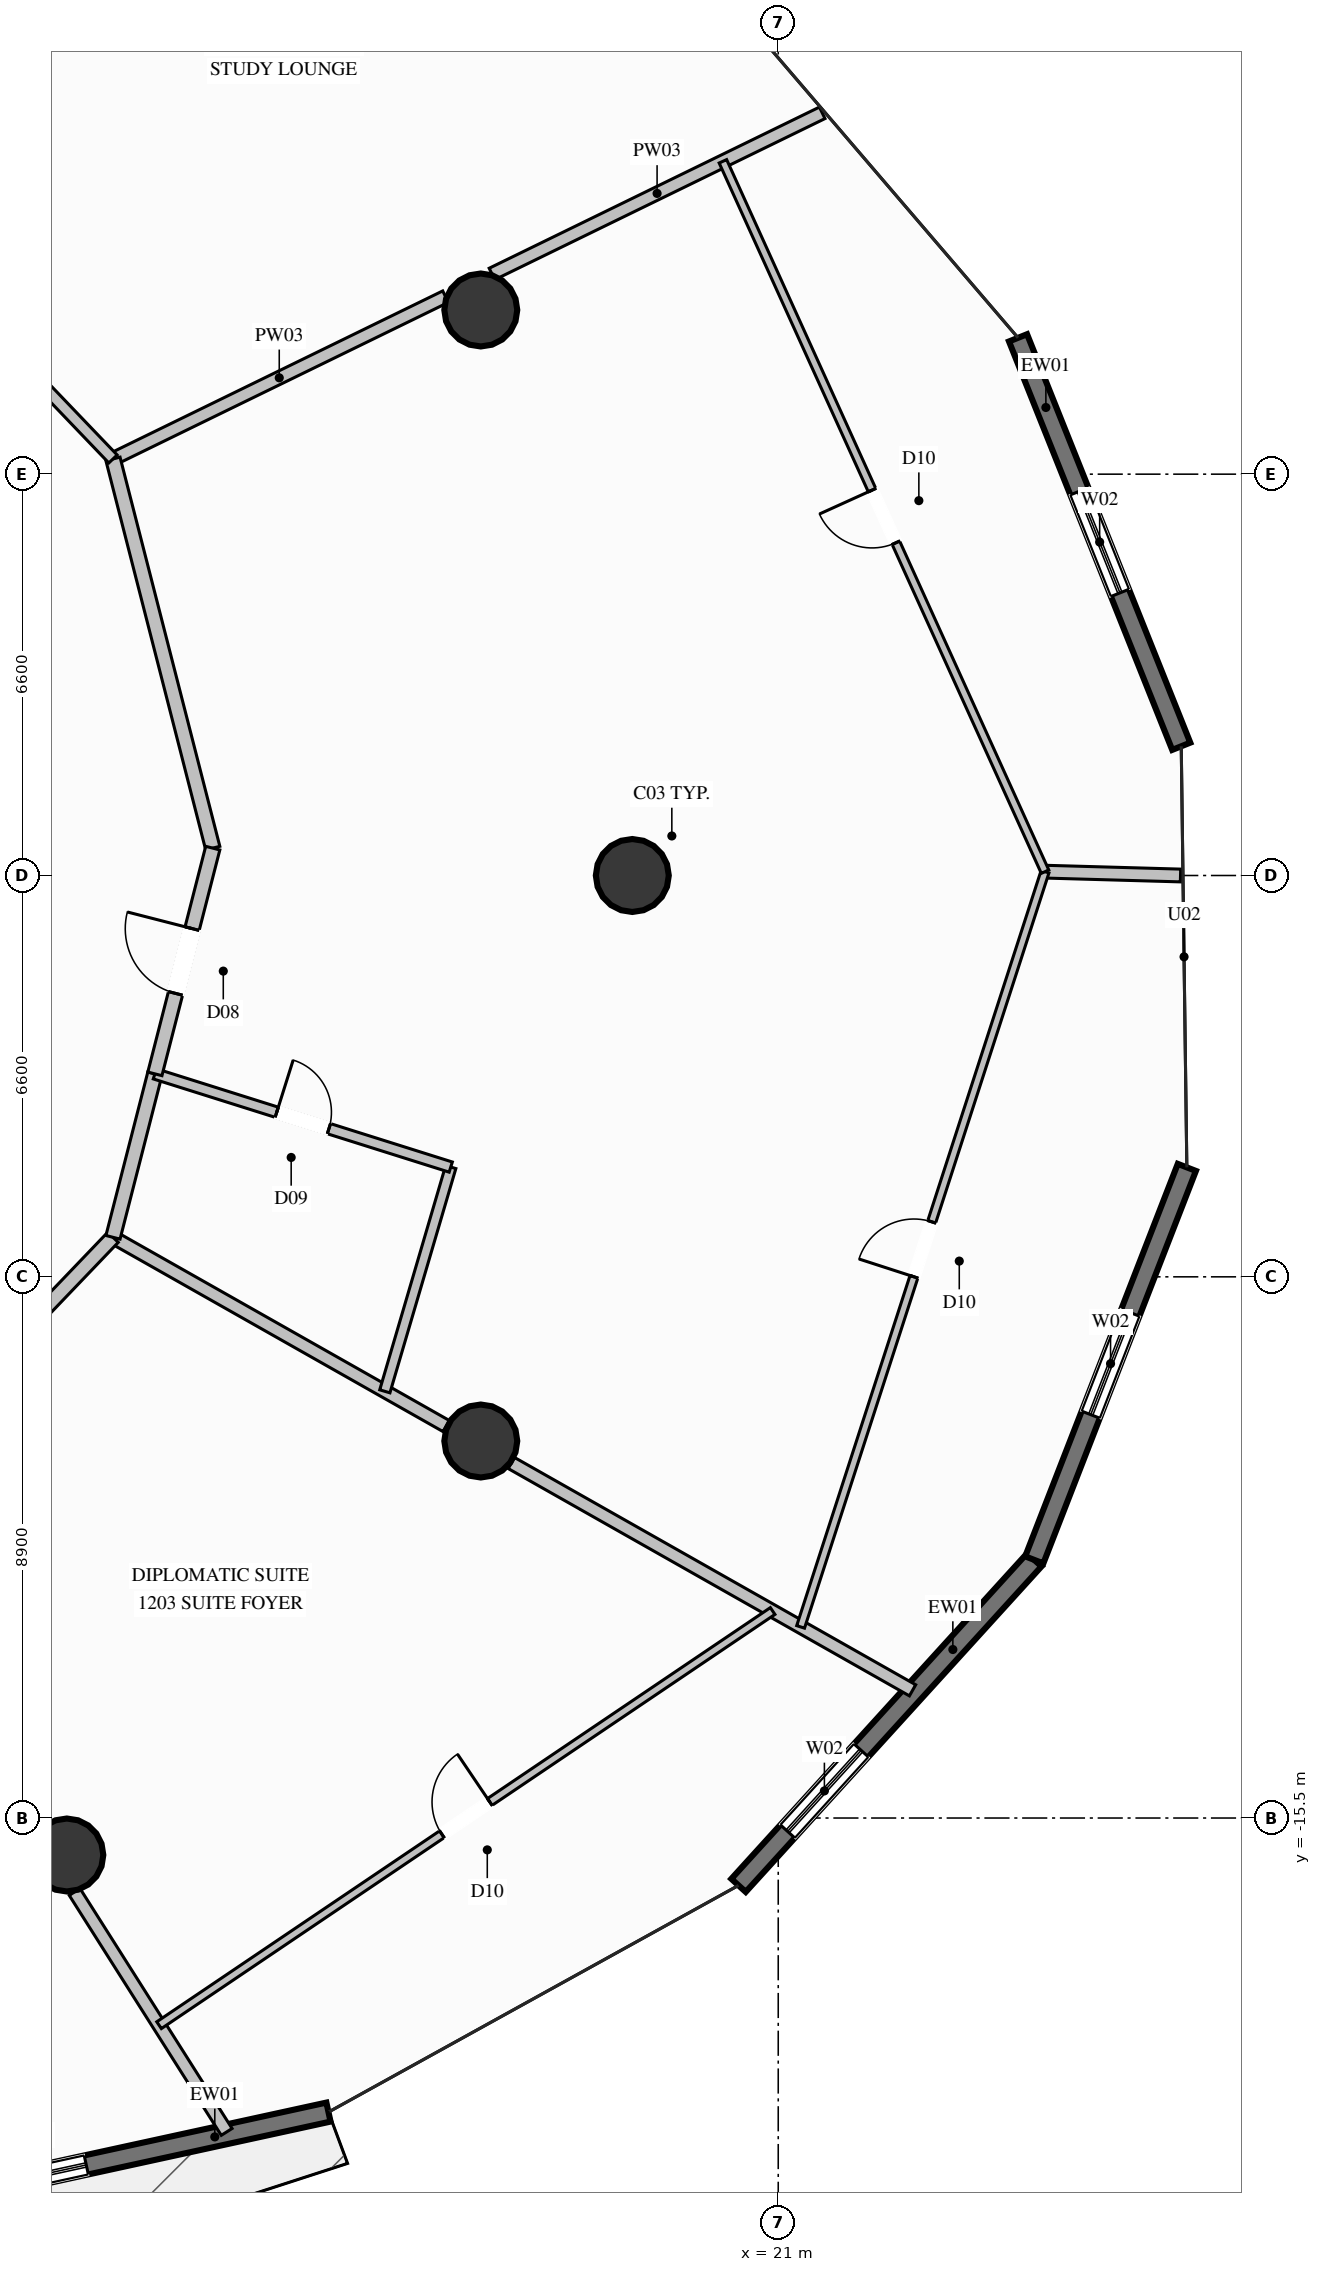
"""IFC4 building model, lengths in metres.
Left out: names, types, materials, properties, quantities, classifications, styles, units other than length and angle.
Written with IfcOpenShell. Run it as: python <this file> out.ifc"""

import sys

from ifc_helpers import new_model, si_unit, direction, frame, frame_2d, origin, origin_2d, place, context, subcontext, project, spatial, rectangle, circle, extrude, element, fill, save


model = new_model("IFC4")
c1 = context("Model", 3, precision=1e-05, world=origin(), true_north=direction((0.0, 1.0)))
c2 = subcontext(c1, "Body", "Model", "MODEL_VIEW")
j1 = project(units=[si_unit("LENGTHUNIT", "METRE"), si_unit("PLANEANGLEUNIT", "RADIAN")], contexts=[c1])
p1 = place(None, origin())
s1 = spatial("IfcSite", under=j1, at=p1, CompositionType="ELEMENT")
p2 = place(p1, origin())
s2 = spatial("IfcBuilding", under=s1, at=p2, CompositionType="ELEMENT")
p3 = place(p2, frame((0.0, 0.0, 46.4)))
s3 = spatial("IfcBuildingStorey", under=s2, at=p3, CompositionType="ELEMENT", Elevation=46.4)
for number, where, z_axis, x_axis in (
    (1, (18.6, 0.0, 0.0), (0.0, 0.0, 1.0), (1.0, 0.0, 0.0)),
    (2, (16.108, 9.3, 0.0), (0.0, 0.0, 1.0), (1.0, 0.0, 0.0)),
    (3, (9.3, -16.108, 0.0), (0.0, 0.0, 1.0), (1.0, 0.0, 0.0)),
    (4, (16.108, -9.3, 0.0), (0.0, 0.0, 1.0), (1.0, 0.0, 0.0)),
):
    element("IfcColumn", number, at=place(p3, frame(where, z_axis=z_axis, x_axis=x_axis)), inside=s3, PredefinedType="COLUMN", context=c2, shape_type="SweptSolid", body=[
        extrude(circle(Radius=0.6, at=origin_2d()), origin(), (0.0, 0.0, 1.0), 3.6),
    ])
p4 = place(p3, frame((24.944, 8.842, 0.0), z_axis=(0.0, 0.0, 1.0), x_axis=(0.371035671342, -0.928618614175, 0.0)))
e5 = element("IfcWall", 5, at=p4, inside=s3, PredefinedType="SOLIDWALL", context=c2, shape_type="SweptSolid", body=[
    extrude(rectangle(XDim=7.233, YDim=0.32, at=frame_2d((3.617, 0.0))), origin(), (0.0, 0.0, 1.0), 3.34),
])
p5 = place(p4, frame((2.717, 0.0, 0.35)))
e6 = element("IfcOpeningElement", 6, at=p5, cuts=e5, PredefinedType="OPENING", context=c2, shape_type="SweptSolid", body=[
    extrude(rectangle(XDim=1.8, YDim=2.6, at=frame_2d((0.9, 1.3))), frame((0.0, 0.17, 0.0), z_axis=(0.0, -1.0, 0.0), x_axis=(1.0, 0.0, 0.0)), (0.0, 0.0, 1.0), 0.34),
])
p6 = place(p3, frame((13.603, -20.336, 0.0), z_axis=(0.0, 0.0, 1.0), x_axis=(-0.977017916809, -0.213157196066, 0.0)))
e7 = element("IfcWall", 7, at=p6, inside=s3, PredefinedType="SOLIDWALL", context=c2, shape_type="SweptSolid", body=[
    extrude(rectangle(XDim=8.149, YDim=0.32, at=frame_2d((4.075, 0.0))), origin(), (0.0, 0.0, 1.0), 3.34),
])
p7 = place(p6, frame((4.077, 0.0, 0.35)))
e8 = element("IfcOpeningElement", 8, at=p7, cuts=e7, PredefinedType="OPENING", context=c2, shape_type="SweptSolid", body=[
    extrude(rectangle(XDim=1.8, YDim=2.6, at=frame_2d((0.9, 1.3))), frame((0.0, 0.17, 0.0), z_axis=(0.0, -1.0, 0.0), x_axis=(1.0, 0.0, 0.0)), (0.0, 0.0, 1.0), 0.34),
])
p8 = place(p3, frame((25.211, -11.255, 0.0), z_axis=(0.0, 0.0, 1.0), x_axis=(-0.672493004141, -0.740103478833, 0.0)))
e9 = element("IfcWall", 9, at=p8, inside=s3, PredefinedType="SOLIDWALL", context=c2, shape_type="SweptSolid", body=[
    extrude(rectangle(XDim=7.233, YDim=0.32, at=frame_2d((3.616, 0.0))), origin(), (0.0, 0.0, 1.0), 3.34),
])
p9 = place(p8, frame((4.233, 0.0, 0.35)))
e10 = element("IfcOpeningElement", 10, at=p9, cuts=e9, PredefinedType="OPENING", context=c2, shape_type="SweptSolid", body=[
    extrude(rectangle(XDim=1.8, YDim=2.6, at=frame_2d((0.9, 1.3))), frame((0.0, 0.17, 0.0), z_axis=(0.0, -1.0, 0.0), x_axis=(1.0, 0.0, 0.0)), (0.0, 0.0, 1.0), 0.34),
])
p10 = place(p3, frame((27.72, -4.8, 0.0), z_axis=(0.0, 0.0, 1.0), x_axis=(-0.362298249398, -0.93206221814, 0.0)))
e11 = element("IfcWall", 11, at=p10, inside=s3, PredefinedType="SOLIDWALL", context=c2, shape_type="SweptSolid", body=[
    extrude(rectangle(XDim=6.925, YDim=0.32, at=frame_2d((3.463, 0.0))), origin(), (0.0, 0.0, 1.0), 3.34),
])
p11 = place(p10, frame((2.563, 0.0, 0.35)))
e12 = element("IfcOpeningElement", 12, at=p11, cuts=e11, PredefinedType="OPENING", context=c2, shape_type="SweptSolid", body=[
    extrude(rectangle(XDim=1.8, YDim=2.6, at=frame_2d((0.9, 1.3))), frame((0.0, 0.17, 0.0), z_axis=(0.0, -1.0, 0.0), x_axis=(1.0, 0.0, 0.0)), (0.0, 0.0, 1.0), 0.34),
])
p12 = place(p3, frame((10.059, 6.85, 0.0), z_axis=(0.0, 0.0, 1.0), x_axis=(0.898694403509, 0.438575385883, 0.0)))
e13 = element("IfcWall", 13, at=p12, inside=s3, PredefinedType="PARTITIONING", context=c2, shape_type="SweptSolid", body=[
    extrude(rectangle(XDim=6.085, YDim=0.21, at=frame_2d((3.043, 0.0))), origin(), (0.0, 0.0, 1.0), 2.709),
])
p13 = place(p3, frame((16.292, 9.892, 0.0), z_axis=(0.0, 0.0, 1.0), x_axis=(0.898724176439, 0.438514372266, 0.0)))
e14 = element("IfcWall", 14, at=p13, inside=s3, PredefinedType="PARTITIONING", context=c2, shape_type="SweptSolid", body=[
    extrude(rectangle(XDim=6.043, YDim=0.21, at=frame_2d((3.021, 0.0))), origin(), (0.0, 0.0, 1.0), 3.34),
])
p14 = place(p3, frame((9.428, -16.715, 0.0), z_axis=(0.0, 0.0, 1.0), x_axis=(0.535234793796, -0.84470332988, 0.0)))
e15 = element("IfcWall", 15, at=p14, inside=s3, PredefinedType="PARTITIONING", context=c2, shape_type="SweptSolid", body=[
    extrude(rectangle(XDim=4.673, YDim=0.21, at=frame_2d((2.336, 0.0))), origin(), (0.0, 0.0, 1.0), 3.34),
])
p15 = place(p3, frame((10.059, -5.95, 0.0), z_axis=(0.0, 0.0, 1.0), x_axis=(0.870111959412, -0.492854114407, 0.0)))
e16 = element("IfcWall", 16, at=p15, inside=s3, PredefinedType="PARTITIONING", context=c2, shape_type="SweptSolid", body=[
    extrude(rectangle(XDim=6.298, YDim=0.21, at=frame_2d((3.149, 0.0))), origin(), (0.0, 0.0, 1.0), 2.709),
])
p16 = place(p3, frame((16.611, -9.662, 0.0), z_axis=(0.0, 0.0, 1.0), x_axis=(0.870079719998, -0.492911027314, 0.0)))
e17 = element("IfcWall", 17, at=p16, inside=s3, PredefinedType="PARTITIONING", context=c2, shape_type="SweptSolid", body=[
    extrude(rectangle(XDim=7.583, YDim=0.21, at=frame_2d((3.792, 0.0))), origin(), (0.0, 0.0, 1.0), 3.34),
])
p17 = place(p3, frame((5.575, -10.635, 0.0), z_axis=(0.0, 0.0, 1.0), x_axis=(0.691445702336, 0.722428432941, 0.0)))
e18 = element("IfcWall", 18, at=p17, inside=s3, PredefinedType="PARTITIONING", context=c2, shape_type="SweptSolid", body=[
    extrude(rectangle(XDim=6.485, YDim=0.24, at=frame_2d((3.243, 0.0))), origin(), (0.0, 0.0, 1.0), 3.34),
])
p18 = place(p3, frame((10.817, -18.907, 0.0), z_axis=(0.0, 0.0, 1.0), x_axis=(0.828865179629, 0.559448401551, 0.0)))
e19 = element("IfcWall", 19, at=p18, inside=s3, PredefinedType="PARTITIONING", context=c2, shape_type="SweptSolid", body=[
    extrude(rectangle(XDim=12.175, YDim=0.135, at=frame_2d((6.087, 0.0))), origin(), (0.0, 0.0, 1.0), 3.34),
])
p19 = place(p18, frame((5.612, 0.0, 0.0)))
e20 = element("IfcOpeningElement", 20, at=p19, cuts=e19, PredefinedType="OPENING", context=c2, shape_type="SweptSolid", body=[
    extrude(rectangle(XDim=0.95, YDim=2.1, at=frame_2d((0.475, 1.05))), frame((0.0, 0.078, 0.0), z_axis=(0.0, -1.0, 0.0), x_axis=(1.0, 0.0, 0.0)), (0.0, 0.0, 1.0), 0.155),
])
p20 = place(p3, frame((10.059, -5.95, 0.0), z_axis=(0.0, 0.0, 1.0), x_axis=(0.248286444079, 0.968686658154, 0.0)))
e21 = element("IfcWall", 21, at=p20, inside=s3, PredefinedType="PARTITIONING", context=c2, shape_type="SweptSolid", body=[
    extrude(rectangle(XDim=2.775, YDim=0.24, at=frame_2d((1.387, 0.0))), origin(), (0.0, 0.0, 1.0), 3.34),
])
p21 = place(p3, frame((14.53, -8.483, 0.0), z_axis=(0.0, 0.0, 1.0), x_axis=(0.281994391394, 0.959416053244, 0.0)))
e22 = element("IfcWall", 22, at=p21, inside=s3, PredefinedType="PLUMBINGWALL", context=c2, shape_type="SweptSolid", body=[
    extrude(rectangle(XDim=3.844, YDim=0.175, at=frame_2d((1.922, 0.0))), origin(), (0.0, 0.0, 1.0), 3.34),
])
p22 = place(p3, frame((10.748, -3.262, 0.0), z_axis=(0.0, 0.0, 1.0), x_axis=(0.95378856577, -0.300478571294, 0.0)))
e23 = element("IfcWall", 23, at=p22, inside=s3, PredefinedType="PLUMBINGWALL", context=c2, shape_type="SweptSolid", body=[
    extrude(rectangle(XDim=5.102, YDim=0.175, at=frame_2d((2.551, 0.0))), origin(), (0.0, 0.0, 1.0), 3.34),
])
p23 = place(p22, frame((2.101, 0.0, 0.0)))
e24 = element("IfcOpeningElement", 24, at=p23, cuts=e23, PredefinedType="OPENING", context=c2, shape_type="SweptSolid", body=[
    extrude(rectangle(XDim=0.9, YDim=2.1, at=frame_2d((0.45, 1.05))), frame((0.0, 0.098, 0.0), z_axis=(0.0, -1.0, 0.0), x_axis=(1.0, 0.0, 0.0)), (0.0, 0.0, 1.0), 0.195),
])
p24 = place(p3, frame((25.388, 0.063, 0.0), z_axis=(0.0, 0.0, 1.0), x_axis=(0.999600618216, -0.028259583552, 0.0)))
e25 = element("IfcWall", 25, at=p24, inside=s3, PredefinedType="PARTITIONING", context=c2, shape_type="SweptSolid", body=[
    extrude(rectangle(XDim=2.229, YDim=0.21, at=frame_2d((1.115, 0.0))), origin(), (0.0, 0.0, 1.0), 3.34),
])
p25 = place(p3, frame((11.7, 0.45, 0.0), z_axis=(0.0, 0.0, 1.0), x_axis=(-0.248347790771, 0.968670932164, 0.0)))
e26 = element("IfcWall", 26, at=p25, inside=s3, PredefinedType="PARTITIONING", context=c2, shape_type="SweptSolid", body=[
    extrude(rectangle(XDim=6.607, YDim=0.24, at=frame_2d((3.304, 0.0))), origin(), (0.0, 0.0, 1.0), 3.34),
])
p26 = place(p3, frame((10.748, -3.262, 0.0), z_axis=(0.0, 0.0, 1.0), x_axis=(0.248407539497, 0.968655611826, 0.0)))
e27 = element("IfcWall", 27, at=p26, inside=s3, PredefinedType="PARTITIONING", context=c2, shape_type="SweptSolid", body=[
    extrude(rectangle(XDim=3.832, YDim=0.24, at=frame_2d((1.916, 0.0))), origin(), (0.0, 0.0, 1.0), 3.34),
])
p27 = place(p26, frame((1.366, 0.0, 0.0)))
e28 = element("IfcOpeningElement", 28, at=p27, cuts=e27, PredefinedType="OPENING", context=c2, shape_type="SweptSolid", body=[
    extrude(rectangle(XDim=1.1, YDim=2.3, at=frame_2d((0.55, 1.15))), frame((0.0, 0.13, 0.0), z_axis=(0.0, -1.0, 0.0), x_axis=(1.0, 0.0, 0.0)), (0.0, 0.0, 1.0), 0.26),
])
p28 = place(p3, frame((21.368, -12.357, 0.0), z_axis=(0.0, 0.0, 1.0), x_axis=(0.307945762787, 0.951403913793, 0.0)))
e29 = element("IfcWall", 29, at=p28, inside=s3, PredefinedType="PARTITIONING", context=c2, shape_type="SweptSolid", body=[
    extrude(rectangle(XDim=13.054, YDim=0.135, at=frame_2d((6.527, 0.0))), origin(), (0.0, 0.0, 1.0), 3.34),
])
p29 = place(p28, frame((6.052, 0.0, 0.0)))
e30 = element("IfcOpeningElement", 30, at=p29, cuts=e29, PredefinedType="OPENING", context=c2, shape_type="SweptSolid", body=[
    extrude(rectangle(XDim=0.95, YDim=2.1, at=frame_2d((0.475, 1.05))), frame((0.0, 0.078, 0.0), z_axis=(0.0, -1.0, 0.0), x_axis=(1.0, 0.0, 0.0)), (0.0, 0.0, 1.0), 0.155),
])
p30 = place(p3, frame((25.388, 0.063, 0.0), z_axis=(0.0, 0.0, 1.0), x_axis=(-0.413014096603, 0.910724632371, 0.0)))
e31 = element("IfcWall", 31, at=p30, inside=s3, PredefinedType="PARTITIONING", context=c2, shape_type="SweptSolid", body=[
    extrude(rectangle(XDim=12.827, YDim=0.135, at=frame_2d((6.414, 0.0))), origin(), (0.0, 0.0, 1.0), 3.34),
])
p31 = place(p30, frame((5.939, 0.0, 0.0)))
e32 = element("IfcOpeningElement", 32, at=p31, cuts=e31, PredefinedType="OPENING", context=c2, shape_type="SweptSolid", body=[
    extrude(rectangle(XDim=0.95, YDim=2.1, at=frame_2d((0.475, 1.05))), frame((0.0, 0.078, 0.0), z_axis=(0.0, -1.0, 0.0), x_axis=(1.0, 0.0, 0.0)), (0.0, 0.0, 1.0), 0.155),
])
p32 = place(p3, frame((10.059, 6.85, 0.0), z_axis=(0.0, 0.0, 1.0), x_axis=(-0.691464507588, 0.722410433719, 0.0)))
e33 = element("IfcWall", 33, at=p32, inside=s3, PredefinedType="PARTITIONING", context=c2, shape_type="SweptSolid", body=[
    extrude(rectangle(XDim=6.485, YDim=0.19, at=frame_2d((3.242, 0.0))), origin(), (0.0, 0.0, 1.0), 3.34),
])
p33 = place(p32, frame((2.768, 0.0, 0.0)))
e34 = element("IfcOpeningElement", 34, at=p33, cuts=e33, PredefinedType="OPENING", context=c2, shape_type="SweptSolid", body=[
    extrude(rectangle(XDim=0.95, YDim=2.1, at=frame_2d((0.475, 1.05))), frame((0.0, 0.105, 0.0), z_axis=(0.0, -1.0, 0.0), x_axis=(1.0, 0.0, 0.0)), (0.0, 0.0, 1.0), 0.21),
])
p34 = place(p5, origin())
e35 = element("IfcWindow", 35, at=p34, inside=s3, PartitioningType="SINGLE_PANEL", PredefinedType="WINDOW", context=c2, shape_type="SweptSolid", body=[
    extrude(rectangle(XDim=1.8, YDim=2.6, at=frame_2d((0.9, 1.3))), frame((0.0, 0.03, 0.0), z_axis=(0.0, -1.0, 0.0), x_axis=(1.0, 0.0, 0.0)), (0.0, 0.0, 1.0), 0.06),
])
fill(e6, e35)
p35 = place(p7, origin())
e36 = element("IfcWindow", 36, at=p35, inside=s3, PartitioningType="SINGLE_PANEL", PredefinedType="WINDOW", context=c2, shape_type="SweptSolid", body=[
    extrude(rectangle(XDim=1.8, YDim=2.6, at=frame_2d((0.9, 1.3))), frame((0.0, 0.03, 0.0), z_axis=(0.0, -1.0, 0.0), x_axis=(1.0, 0.0, 0.0)), (0.0, 0.0, 1.0), 0.06),
])
fill(e8, e36)
p36 = place(p9, origin())
e37 = element("IfcWindow", 37, at=p36, inside=s3, PartitioningType="SINGLE_PANEL", PredefinedType="WINDOW", context=c2, shape_type="SweptSolid", body=[
    extrude(rectangle(XDim=1.8, YDim=2.6, at=frame_2d((0.9, 1.3))), frame((0.0, 0.03, 0.0), z_axis=(0.0, -1.0, 0.0), x_axis=(1.0, 0.0, 0.0)), (0.0, 0.0, 1.0), 0.06),
])
fill(e10, e37)
p37 = place(p11, origin())
e38 = element("IfcWindow", 38, at=p37, inside=s3, PartitioningType="SINGLE_PANEL", PredefinedType="WINDOW", context=c2, shape_type="SweptSolid", body=[
    extrude(rectangle(XDim=1.8, YDim=2.6, at=frame_2d((0.9, 1.3))), frame((0.0, 0.03, 0.0), z_axis=(0.0, -1.0, 0.0), x_axis=(1.0, 0.0, 0.0)), (0.0, 0.0, 1.0), 0.06),
])
fill(e12, e38)
p38 = place(p19, origin())
e39 = element("IfcDoor", 39, at=p38, inside=s3, OperationType="SINGLE_SWING_RIGHT", PredefinedType="DOOR", context=c2, shape_type="SweptSolid", body=[
    extrude(rectangle(XDim=0.95, YDim=2.1, at=frame_2d((0.475, 1.05))), frame((0.0, 0.025, 0.0), z_axis=(0.0, -1.0, 0.0), x_axis=(1.0, 0.0, 0.0)), (0.0, 0.0, 1.0), 0.05),
])
fill(e20, e39)
p39 = place(p23, origin())
e40 = element("IfcDoor", 40, at=p39, inside=s3, OperationType="SINGLE_SWING_LEFT", PredefinedType="DOOR", context=c2, shape_type="SweptSolid", body=[
    extrude(rectangle(XDim=0.9, YDim=2.1, at=frame_2d((0.45, 1.05))), frame((0.0, 0.025, 0.0), z_axis=(0.0, -1.0, 0.0), x_axis=(1.0, 0.0, 0.0)), (0.0, 0.0, 1.0), 0.05),
])
fill(e24, e40)
p40 = place(p27, origin())
e41 = element("IfcDoor", 41, at=p40, inside=s3, OperationType="SINGLE_SWING_RIGHT", PredefinedType="DOOR", context=c2, shape_type="SweptSolid", body=[
    extrude(rectangle(XDim=1.1, YDim=2.3, at=frame_2d((0.55, 1.15))), frame((0.0, 0.025, 0.0), z_axis=(0.0, -1.0, 0.0), x_axis=(1.0, 0.0, 0.0)), (0.0, 0.0, 1.0), 0.05),
])
fill(e28, e41)
p41 = place(p29, origin())
e42 = element("IfcDoor", 42, at=p41, inside=s3, OperationType="SINGLE_SWING_LEFT", PredefinedType="DOOR", context=c2, shape_type="SweptSolid", body=[
    extrude(rectangle(XDim=0.95, YDim=2.1, at=frame_2d((0.475, 1.05))), frame((0.0, 0.025, 0.0), z_axis=(0.0, -1.0, 0.0), x_axis=(1.0, 0.0, 0.0)), (0.0, 0.0, 1.0), 0.05),
])
fill(e30, e42)
p42 = place(p31, origin())
e43 = element("IfcDoor", 43, at=p42, inside=s3, OperationType="SINGLE_SWING_RIGHT", PredefinedType="DOOR", context=c2, shape_type="SweptSolid", body=[
    extrude(rectangle(XDim=0.95, YDim=2.1, at=frame_2d((0.475, 1.05))), frame((0.0, 0.025, 0.0), z_axis=(0.0, -1.0, 0.0), x_axis=(1.0, 0.0, 0.0)), (0.0, 0.0, 1.0), 0.05),
])
fill(e32, e43)
save(model, sys.argv[1])
